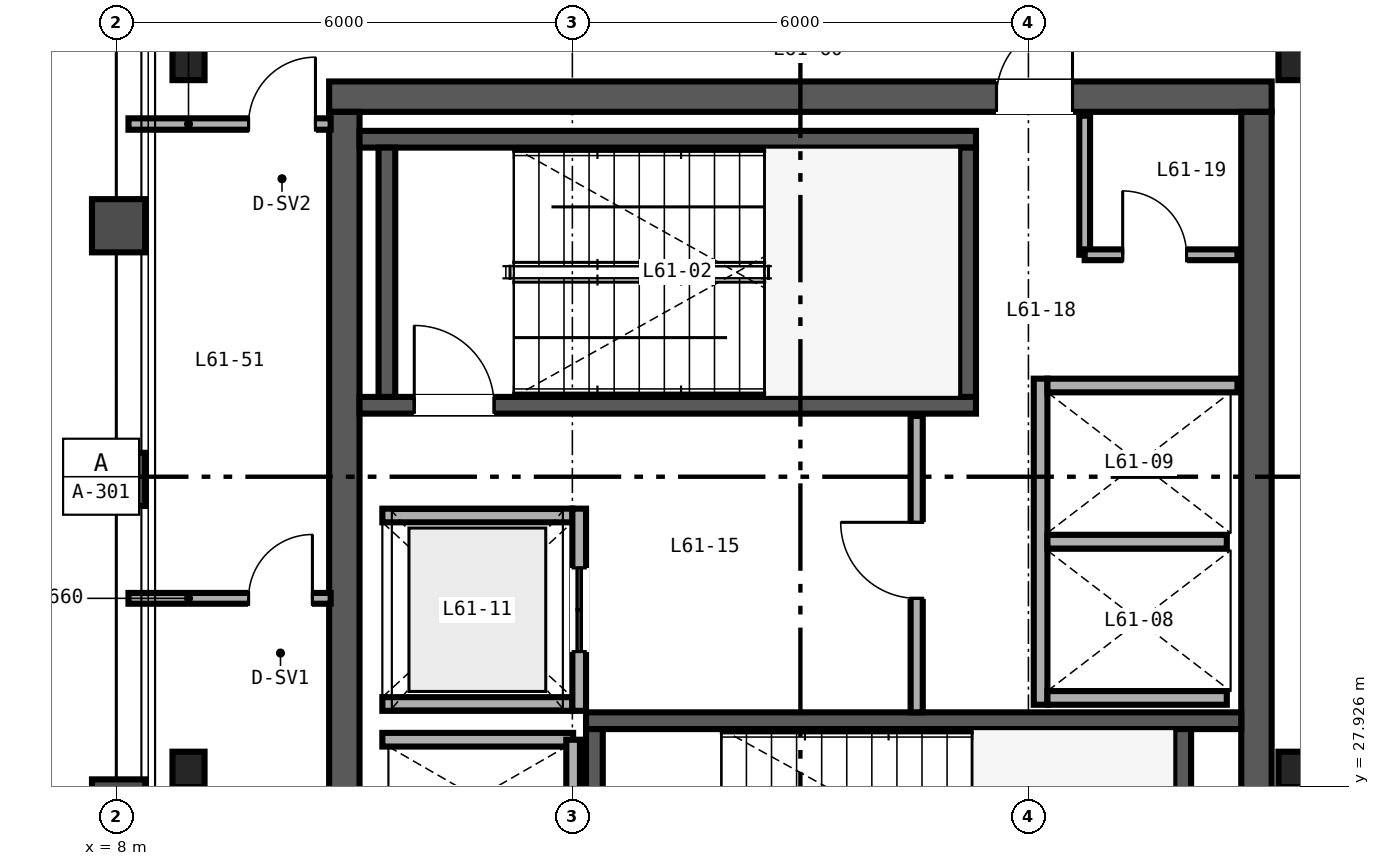
"""IFC4 building model, lengths in metres.
Left out: names, types, materials, properties, quantities, classifications, styles, units other than length and angle.
Written with IfcOpenShell. Run it as: python <this file> out.ifc"""

import sys

from ifc_helpers import new_model, si_unit, direction, frame, frame_2d, origin, origin_2d, place, context, subcontext, project, spatial, rectangle, i_section, extrude, source, transform, mapped, element, fill, save


model = new_model("IFC4")
c1 = context("Model", 3, precision=1e-05, world=origin(), true_north=direction((0.0, 1.0)))
c2 = subcontext(c1, "Body", "Model", "MODEL_VIEW")
j1 = project(units=[si_unit("LENGTHUNIT", "METRE"), si_unit("PLANEANGLEUNIT", "RADIAN")], contexts=[c1])
p1 = place(None, origin())
s1 = spatial("IfcSite", under=j1, at=p1, CompositionType="ELEMENT")
p2 = place(p1, origin())
s2 = spatial("IfcBuilding", under=s1, at=p2, CompositionType="ELEMENT")
p3 = place(p2, frame((0.0, 0.0, 243.6)))
s3 = spatial("IfcBuildingStorey", under=s2, at=p3, CompositionType="ELEMENT", Elevation=243.6)
p4 = place(p3, frame((10.8, 37.0, 0.0), z_axis=(0.0, 0.0, 1.0), x_axis=(1.0, 0.0, 0.0)))
e1 = element("IfcWall", 1, at=p4, inside=s3, PredefinedType="SHEAR", context=c2, shape_type="SweptSolid", body=[
    extrude(rectangle(XDim=12.4, YDim=0.4, at=frame_2d((6.2, 0.0))), origin(), (0.0, 0.0, 1.0), 3.28),
])
p5 = place(p4, frame((8.78, 0.0, 0.0)))
e2 = element("IfcOpeningElement", 2, at=p5, cuts=e1, PredefinedType="OPENING", context=c2, shape_type="SweptSolid", body=[
    extrude(rectangle(XDim=1.0, YDim=2.15, at=frame_2d((0.5, 1.075))), frame((0.0, 0.21, 0.0), z_axis=(0.0, -1.0, 0.0), x_axis=(1.0, 0.0, 0.0)), (0.0, 0.0, 1.0), 0.42),
])
for number, where, z_axis, x_axis in (
    (3, (11.0, 15.2, 0.0), (0.0, 0.0, 1.0), (0.0, 1.0, 0.0)),
    (4, (23.0, 15.2, 0.0), (0.0, 0.0, 1.0), (0.0, 1.0, 0.0)),
):
    element("IfcWall", number, at=place(p3, frame(where, z_axis=z_axis, x_axis=x_axis)), inside=s3, PredefinedType="SHEAR", context=c2, shape_type="SweptSolid", body=[
        extrude(rectangle(XDim=21.6, YDim=0.4, at=frame_2d((10.8, 0.0))), origin(), (0.0, 0.0, 1.0), 3.28),
    ])
p6 = place(p3, frame((11.2, 32.94, 0.0), z_axis=(0.0, 0.0, 1.0), x_axis=(1.0, 0.0, 0.0)))
e5 = element("IfcWall", 5, at=p6, inside=s3, PredefinedType="SHEAR", context=c2, shape_type="SweptSolid", body=[
    extrude(rectangle(XDim=8.11, YDim=0.22, at=frame_2d((4.055, 0.0))), origin(), (0.0, 0.0, 1.0), 3.4),
])
p7 = place(p6, frame((0.72, 0.0, 0.0)))
e6 = element("IfcOpeningElement", 6, at=p7, cuts=e5, PredefinedType="OPENING", context=c2, shape_type="SweptSolid", body=[
    extrude(rectangle(XDim=1.05, YDim=2.15, at=frame_2d((0.525, 1.075))), frame((0.0, 0.12, 0.0), z_axis=(0.0, -1.0, 0.0), x_axis=(1.0, 0.0, 0.0)), (0.0, 0.0, 1.0), 0.24),
])
p8 = place(p3, frame((11.2, 36.44, 0.0), z_axis=(0.0, 0.0, 1.0), x_axis=(1.0, 0.0, 0.0)))
e7 = element("IfcWall", 7, at=p8, inside=s3, PredefinedType="SHEAR", context=c2, shape_type="SweptSolid", body=[
    extrude(rectangle(XDim=8.11, YDim=0.22, at=frame_2d((4.055, 0.0))), origin(), (0.0, 0.0, 1.0), 3.4),
])
for number, where, z_axis, x_axis in (
    (8, (11.56, 33.05, 0.0), (0.0, 0.0, 1.0), (0.0, 1.0, 0.0)),
    (9, (19.2, 33.05, 0.0), (0.0, 0.0, 1.0), (0.0, 1.0, 0.0)),
):
    element("IfcWall", number, at=place(p3, frame(where, z_axis=z_axis, x_axis=x_axis)), inside=s3, PredefinedType="SHEAR", context=c2, shape_type="SweptSolid", body=[
        extrude(rectangle(XDim=3.28, YDim=0.22, at=frame_2d((1.64, 0.0))), origin(), (0.0, 0.0, 1.0), 3.4),
    ])
p9 = place(p3, frame((14.18, 28.79, 0.0), z_axis=(0.0, 0.0, 1.0), x_axis=(1.0, 0.0, 0.0)))
e10 = element("IfcWall", 10, at=p9, inside=s3, PredefinedType="SHEAR", context=c2, shape_type="SweptSolid", body=[
    extrude(rectangle(XDim=8.62, YDim=0.22, at=frame_2d((4.31, 0.0))), origin(), (0.0, 0.0, 1.0), 3.4),
])
for number, where, z_axis, x_axis in (
    (11, (14.29, 25.4, 0.0), (0.0, 0.0, 1.0), (0.0, 1.0, 0.0)),
    (12, (22.03, 25.4, 0.0), (0.0, 0.0, 1.0), (0.0, 1.0, 0.0)),
):
    element("IfcWall", number, at=place(p3, frame(where, z_axis=z_axis, x_axis=x_axis)), inside=s3, PredefinedType="SHEAR", context=c2, shape_type="SweptSolid", body=[
        extrude(rectangle(XDim=3.28, YDim=0.22, at=frame_2d((1.64, 0.0))), origin(), (0.0, 0.0, 1.0), 3.4),
    ])
m1 = source(origin(), c2, "Body", "SweptSolid", [
    extrude(i_section(OverallWidth=0.422, OverallDepth=0.465, WebThickness=0.045, FlangeThickness=0.073, FilletRadius=0.025, at=origin_2d()), origin(), (0.0, 0.0, 1.0), 3.28),
])
for number, where, z_axis, x_axis in (
    (13, (8.95, 28.15, 0.0), (0.0, 0.0, 1.0), (1.0, 0.0, 0.0)),
    (14, (23.5, 28.15, 0.0), (0.0, 0.0, 1.0), (1.0, 0.0, 0.0)),
    (15, (8.95, 37.45, 0.0), (0.0, 0.0, 1.0), (1.0, 0.0, 0.0)),
    (16, (23.5, 37.45, 0.0), (0.0, 0.0, 1.0), (1.0, 0.0, 0.0)),
):
    element("IfcColumn", number, at=place(p3, frame(where, z_axis=z_axis, x_axis=x_axis)), inside=s3, PredefinedType="COLUMN", context=c2, shape_type="MappedRepresentation", body=[
        mapped(m1, transform((0.0, 0.0, 0.0), scale=1.0)),
    ])
p10 = place(p3, frame((20.16, 29.0, 0.0), z_axis=(0.0, 0.0, 1.0), x_axis=(0.0, 1.0, 0.0)))
e17 = element("IfcWall", 17, at=p10, inside=s3, PredefinedType="SOLIDWALL", context=c2, shape_type="SweptSolid", body=[
    extrude(rectangle(XDim=4.29, YDim=0.18, at=frame_2d((2.145, 0.0))), origin(), (0.0, 0.0, 1.0), 3.28),
])
p11 = place(p3, frame((20.25, 29.09, 0.0), z_axis=(0.0, 0.0, 1.0), x_axis=(1.0, 0.0, 0.0)))
e18 = element("IfcWall", 18, at=p11, inside=s3, PredefinedType="SOLIDWALL", context=c2, shape_type="SweptSolid", body=[
    extrude(rectangle(XDim=2.36, YDim=0.18, at=frame_2d((1.18, 0.0))), origin(), (0.0, 0.0, 1.0), 3.28),
])
p12 = place(p3, frame((20.25, 33.2, 0.0), z_axis=(0.0, 0.0, 1.0), x_axis=(1.0, 0.0, 0.0)))
e19 = element("IfcWall", 19, at=p12, inside=s3, PredefinedType="SOLIDWALL", context=c2, shape_type="SweptSolid", body=[
    extrude(rectangle(XDim=2.5, YDim=0.18, at=frame_2d((1.25, 0.0))), origin(), (0.0, 0.0, 1.0), 3.28),
])
p13 = place(p3, frame((20.25, 31.145, 0.0), z_axis=(0.0, 0.0, 1.0), x_axis=(1.0, 0.0, 0.0)))
e20 = element("IfcWall", 20, at=p13, inside=s3, PredefinedType="SOLIDWALL", context=c2, shape_type="SweptSolid", body=[
    extrude(rectangle(XDim=2.36, YDim=0.18, at=frame_2d((1.18, 0.0))), origin(), (0.0, 0.0, 1.0), 3.28),
])
for number, where, z_axis, x_axis in (
    (21, (11.5, 29.01, 0.0), (0.0, 0.0, 1.0), (1.0, 0.0, 0.0)),
    (22, (11.5, 31.49, 0.0), (0.0, 0.0, 1.0), (1.0, 0.0, 0.0)),
):
    element("IfcWall", number, at=place(p3, frame(where, z_axis=z_axis, x_axis=x_axis)), inside=s3, PredefinedType="SOLIDWALL", context=c2, shape_type="SweptSolid", body=[
        extrude(rectangle(XDim=2.5, YDim=0.18, at=frame_2d((1.25, 0.0))), origin(), (0.0, 0.0, 1.0), 3.28),
    ])
p14 = place(p3, frame((14.09, 28.92, 0.0), z_axis=(0.0, 0.0, 1.0), x_axis=(0.0, 1.0, 0.0)))
e23 = element("IfcWall", 23, at=p14, inside=s3, PredefinedType="SOLIDWALL", context=c2, shape_type="SweptSolid", body=[
    extrude(rectangle(XDim=2.66, YDim=0.18, at=frame_2d((1.33, 0.0))), origin(), (0.0, 0.0, 1.0), 3.28),
])
p15 = place(p14, frame((0.78, 0.0, 0.0)))
e24 = element("IfcOpeningElement", 24, at=p15, cuts=e23, PredefinedType="OPENING", context=c2, shape_type="SweptSolid", body=[
    extrude(rectangle(XDim=1.1, YDim=2.2, at=frame_2d((0.55, 1.1))), frame((0.0, 0.1, 0.0), z_axis=(0.0, -1.0, 0.0), x_axis=(1.0, 0.0, 0.0)), (0.0, 0.0, 1.0), 0.2),
])
p16 = place(p3, frame((11.5, 28.54, 0.0), z_axis=(0.0, 0.0, 1.0), x_axis=(1.0, 0.0, 0.0)))
e25 = element("IfcWall", 25, at=p16, inside=s3, PredefinedType="SOLIDWALL", context=c2, shape_type="SweptSolid", body=[
    extrude(rectangle(XDim=2.51, YDim=0.18, at=frame_2d((1.255, 0.0))), origin(), (0.0, 0.0, 1.0), 3.28),
])
p17 = place(p3, frame((14.01, 25.46, 0.0), z_axis=(0.0, 0.0, 1.0), x_axis=(0.0, 1.0, 0.0)))
e26 = element("IfcWall", 26, at=p17, inside=s3, PredefinedType="SOLIDWALL", context=c2, shape_type="SweptSolid", body=[
    extrude(rectangle(XDim=3.08, YDim=0.18, at=frame_2d((1.54, 0.0))), origin(), (0.0, 0.0, 1.0), 3.28),
])
p18 = place(p3, frame((18.53, 28.9, 0.0), z_axis=(0.0, 0.0, 1.0), x_axis=(0.0, 1.0, 0.0)))
e27 = element("IfcWall", 27, at=p18, inside=s3, PredefinedType="PARTITIONING", context=c2, shape_type="SweptSolid", body=[
    extrude(rectangle(XDim=3.9, YDim=0.16, at=frame_2d((1.95, 0.0))), origin(), (0.0, 0.0, 1.0), 3.28),
])
p19 = place(p18, frame((1.5, 0.0, 0.0)))
e28 = element("IfcOpeningElement", 28, at=p19, cuts=e27, PredefinedType="OPENING", context=c2, shape_type="SweptSolid", body=[
    extrude(rectangle(XDim=1.0, YDim=2.15, at=frame_2d((0.5, 1.075))), frame((0.0, 0.09, 0.0), z_axis=(0.0, -1.0, 0.0), x_axis=(1.0, 0.0, 0.0)), (0.0, 0.0, 1.0), 0.18),
])
p20 = place(p3, frame((20.74, 34.92, 0.0), z_axis=(0.0, 0.0, 1.0), x_axis=(0.0, 1.0, 0.0)))
e29 = element("IfcWall", 29, at=p20, inside=s3, PredefinedType="PARTITIONING", context=c2, shape_type="SweptSolid", body=[
    extrude(rectangle(XDim=1.83, YDim=0.142, at=frame_2d((0.915, 0.0))), origin(), (0.0, 0.0, 1.0), 3.28),
])
p21 = place(p3, frame((20.74, 34.92, 0.0), z_axis=(0.0, 0.0, 1.0), x_axis=(1.0, 0.0, 0.0)))
e30 = element("IfcWall", 30, at=p21, inside=s3, PredefinedType="PARTITIONING", context=c2, shape_type="SweptSolid", body=[
    extrude(rectangle(XDim=2.01, YDim=0.142, at=frame_2d((1.005, 0.0))), origin(), (0.0, 0.0, 1.0), 3.28),
])
p22 = place(p21, frame((0.5, 0.0, 0.0)))
e31 = element("IfcOpeningElement", 31, at=p22, cuts=e30, PredefinedType="OPENING", context=c2, shape_type="SweptSolid", body=[
    extrude(rectangle(XDim=0.84, YDim=2.1, at=frame_2d((0.42, 1.05))), frame((0.0, 0.081, 0.0), z_axis=(0.0, -1.0, 0.0), x_axis=(1.0, 0.0, 0.0)), (0.0, 0.0, 1.0), 0.162),
])
p23 = place(p3, frame((8.16, 36.64, 0.0), z_axis=(0.0, 0.0, 1.0), x_axis=(1.0, 0.0, 0.0)))
e32 = element("IfcWall", 32, at=p23, inside=s3, PredefinedType="PARTITIONING", context=c2, shape_type="SweptSolid", body=[
    extrude(rectangle(XDim=2.66, YDim=0.15, at=frame_2d((1.33, 0.0))), origin(), (0.0, 0.0, 1.0), 2.663),
])
p24 = place(p23, frame((1.58, 0.0, 0.0)))
e33 = element("IfcOpeningElement", 33, at=p24, cuts=e32, PredefinedType="OPENING", context=c2, shape_type="SweptSolid", body=[
    extrude(rectangle(XDim=0.88, YDim=2.15, at=frame_2d((0.44, 1.075))), frame((0.0, 0.085, 0.0), z_axis=(0.0, -1.0, 0.0), x_axis=(1.0, 0.0, 0.0)), (0.0, 0.0, 1.0), 0.17),
])
p25 = place(p3, frame((8.16, 30.4, 0.0), z_axis=(0.0, 0.0, 1.0), x_axis=(1.0, 0.0, 0.0)))
e34 = element("IfcWall", 34, at=p25, inside=s3, PredefinedType="PARTITIONING", context=c2, shape_type="SweptSolid", body=[
    extrude(rectangle(XDim=2.66, YDim=0.142, at=frame_2d((1.33, 0.0))), origin(), (0.0, 0.0, 1.0), 2.663),
])
p26 = place(p25, frame((1.58, 0.0, 0.0)))
e35 = element("IfcOpeningElement", 35, at=p26, cuts=e34, PredefinedType="OPENING", context=c2, shape_type="SweptSolid", body=[
    extrude(rectangle(XDim=0.84, YDim=2.1, at=frame_2d((0.42, 1.05))), frame((0.0, 0.081, 0.0), z_axis=(0.0, -1.0, 0.0), x_axis=(1.0, 0.0, 0.0)), (0.0, 0.0, 1.0), 0.162),
])
m2 = source(origin(), c2, "Body", "SweptSolid", [
    extrude(rectangle(XDim=1.05, YDim=2.15, at=frame_2d((0.525, 1.075))), frame((0.0, 0.025, 0.0), z_axis=(0.0, -1.0, 0.0), x_axis=(1.0, 0.0, 0.0)), (0.0, 0.0, 1.0), 0.05),
])
p27 = place(p7, origin())
e36 = element("IfcDoor", 36, at=p27, inside=s3, OperationType="SINGLE_SWING_LEFT", PredefinedType="DOOR", context=c2, shape_type="MappedRepresentation", body=[
    mapped(m2, transform((0.0, 0.0, 0.0), scale=1.0)),
])
fill(e6, e36)
m3 = source(origin(), c2, "Body", "SweptSolid", [
    extrude(rectangle(XDim=1.1, YDim=2.2, at=frame_2d((0.55, 1.1))), frame((0.0, 0.025, 0.0), z_axis=(0.0, -1.0, 0.0), x_axis=(1.0, 0.0, 0.0)), (0.0, 0.0, 1.0), 0.05),
])
p28 = place(p15, origin())
e37 = element("IfcDoor", 37, at=p28, inside=s3, OperationType="DOUBLE_DOOR_SLIDING", PredefinedType="DOOR", context=c2, shape_type="MappedRepresentation", body=[
    mapped(m3, transform((0.0, 0.0, 0.0), scale=1.0)),
])
fill(e24, e37)
m4 = source(origin(), c2, "Body", "SweptSolid", [
    extrude(rectangle(XDim=1.0, YDim=2.15, at=frame_2d((0.5, 1.075))), frame((0.0, 0.025, 0.0), z_axis=(0.0, -1.0, 0.0), x_axis=(1.0, 0.0, 0.0)), (0.0, 0.0, 1.0), 0.05),
])
p29 = place(p19, origin())
e38 = element("IfcDoor", 38, at=p29, inside=s3, OperationType="SINGLE_SWING_RIGHT", PredefinedType="DOOR", context=c2, shape_type="MappedRepresentation", body=[
    mapped(m4, transform((0.0, 0.0, 0.0), scale=1.0)),
])
fill(e28, e38)
m5 = source(origin(), c2, "Body", "SweptSolid", [
    extrude(rectangle(XDim=0.84, YDim=2.1, at=frame_2d((0.42, 1.05))), frame((0.0, 0.025, 0.0), z_axis=(0.0, -1.0, 0.0), x_axis=(1.0, 0.0, 0.0)), (0.0, 0.0, 1.0), 0.05),
])
p30 = place(p22, origin())
e39 = element("IfcDoor", 39, at=p30, inside=s3, OperationType="SINGLE_SWING_LEFT", PredefinedType="DOOR", context=c2, shape_type="MappedRepresentation", body=[
    mapped(m5, transform((0.0, 0.0, 0.0), scale=1.0)),
])
fill(e31, e39)
p31 = place(p5, origin())
e40 = element("IfcDoor", 40, at=p31, inside=s3, OperationType="SINGLE_SWING_RIGHT", PredefinedType="DOOR", context=c2, shape_type="MappedRepresentation", body=[
    mapped(m4, transform((0.0, 0.0, 0.0), scale=1.0)),
])
fill(e2, e40)
m6 = source(origin(), c2, "Body", "SweptSolid", [
    extrude(rectangle(XDim=0.88, YDim=2.15, at=frame_2d((0.44, 1.075))), frame((0.0, 0.025, 0.0), z_axis=(0.0, -1.0, 0.0), x_axis=(1.0, 0.0, 0.0)), (0.0, 0.0, 1.0), 0.05),
])
p32 = place(p24, origin())
e41 = element("IfcDoor", 41, at=p32, inside=s3, OperationType="SINGLE_SWING_RIGHT", PredefinedType="DOOR", context=c2, shape_type="MappedRepresentation", body=[
    mapped(m6, transform((0.0, 0.0, 0.0), scale=1.0)),
])
fill(e33, e41)
p33 = place(p26, origin())
e42 = element("IfcDoor", 42, at=p33, inside=s3, OperationType="SINGLE_SWING_RIGHT", PredefinedType="DOOR", context=c2, shape_type="MappedRepresentation", body=[
    mapped(m5, transform((0.0, 0.0, 0.0), scale=1.0)),
])
fill(e35, e42)
save(model, sys.argv[1])
